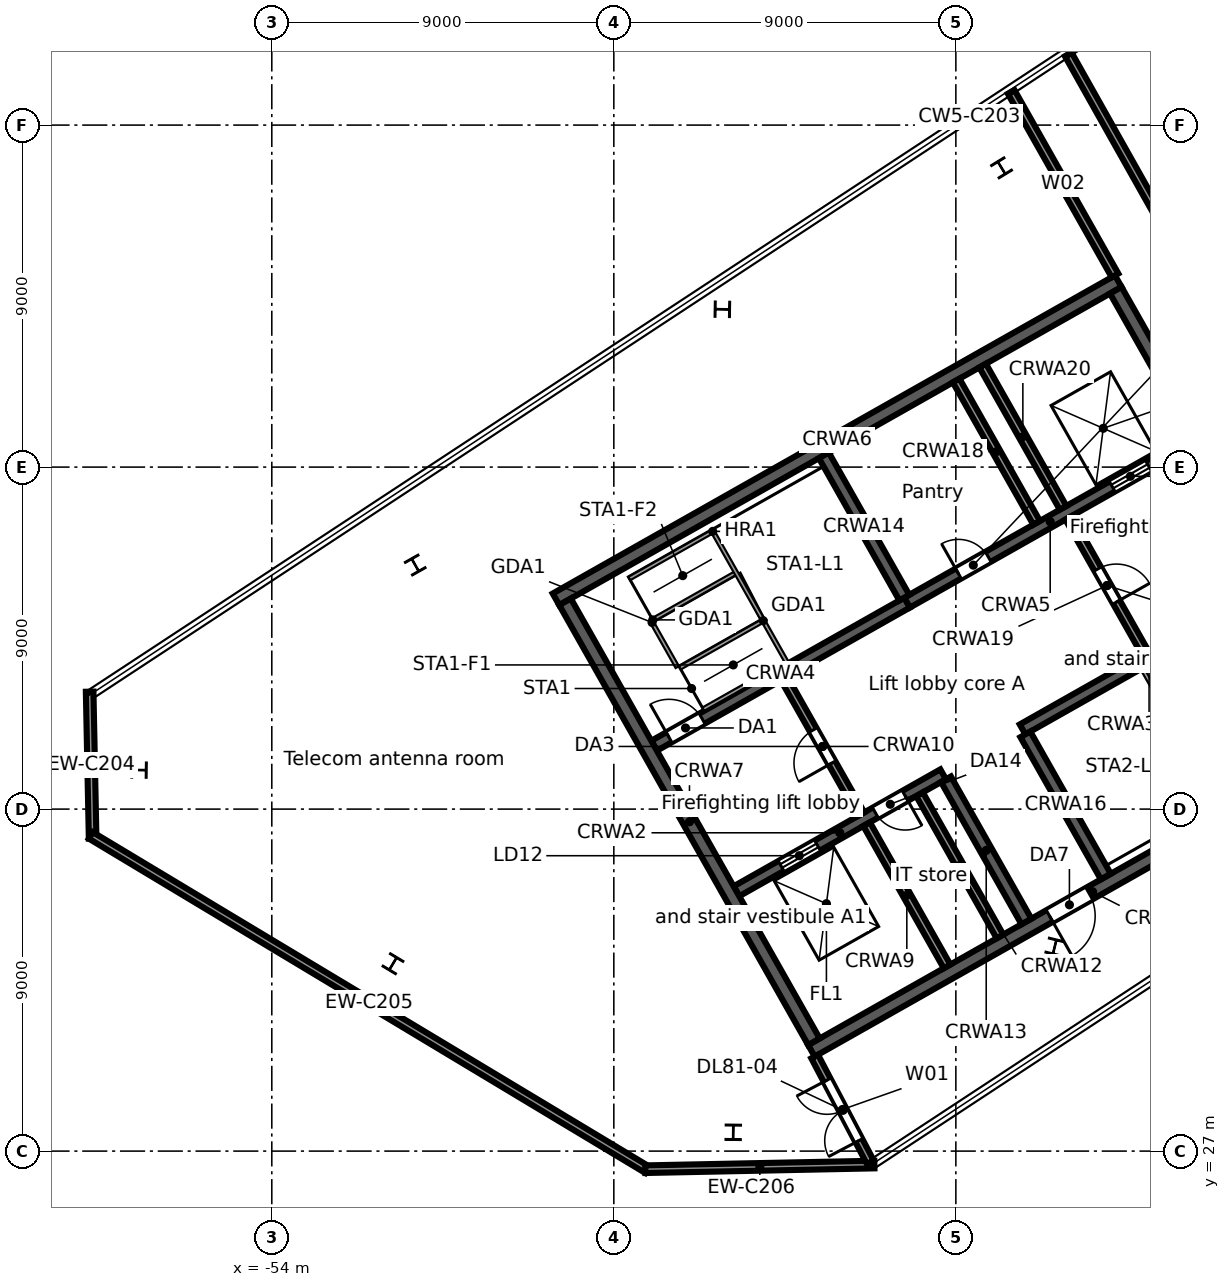
"""IFC4 building model, lengths in metres.
Left out: names, types, materials, properties, quantities, classifications, styles, units other than length and angle.
Written with IfcOpenShell. Run it as: python <this file> out.ifc"""

import sys

from ifc_helpers import new_model, si_unit, direction, frame, frame_2d, origin, origin_2d, place, context, subcontext, project, spatial, rectangle, i_section, extrude, element, fill, save


model = new_model("IFC4")
c1 = context("Model", 3, precision=1e-05, world=origin(), true_north=direction((0.0, 1.0)))
c2 = subcontext(c1, "Body", "Model", "MODEL_VIEW")
j1 = project(units=[si_unit("LENGTHUNIT", "METRE"), si_unit("PLANEANGLEUNIT", "RADIAN")], contexts=[c1])
p1 = place(None, origin())
s1 = spatial("IfcSite", under=j1, at=p1, CompositionType="ELEMENT")
p2 = place(p1, origin())
s2 = spatial("IfcBuilding", under=s1, at=p2, CompositionType="ELEMENT")
p3 = place(p2, frame((0.0, 0.0, 354.1)))
s3 = spatial("IfcBuildingStorey", under=s2, at=p3, CompositionType="ELEMENT", Elevation=354.1)
for number, where, z_axis, x_axis in (
    (1, (-50.226, 42.423, 0.0), (0.0, 0.0, 1.0), (-0.87, -0.492, 0.0)),
    (2, (-57.493, 37.027, 0.0), (0.0, 0.0, 1.0), (-0.013, -1.0, 0.0)),
    (3, (-50.812, 31.931, 0.0), (0.0, 0.0, 1.0), (0.857, -0.515, 0.0)),
    (4, (-41.858, 27.495, 0.0), (0.0, 0.0, 1.0), (1.0, -0.013, 0.0)),
):
    element("IfcColumn", number, at=place(p3, frame(where, z_axis=z_axis, x_axis=x_axis)), inside=s3, PredefinedType="COLUMN", context=c2, shape_type="SweptSolid", body=[
        extrude(i_section(OverallWidth=0.4, OverallDepth=0.4, WebThickness=0.013, FlangeThickness=0.021, FilletRadius=0.022, at=origin_2d()), origin(), (0.0, 0.0, 1.0), 3.6),
    ])
for number, where, z_axis, x_axis in (
    (5, (-34.798, 52.875, -0.3), (0.0, 0.0, 1.0), (0.853, 0.521, 0.0)),
    (6, (-42.144, 49.153, -0.3), (0.0, 0.0, 1.0), (0.018, 1.0, 0.0)),
    (7, (-33.4, 32.374, -0.3), (0.0, 0.0, 1.0), (-0.971, 0.239, 0.0)),
):
    element("IfcColumn", number, at=place(p3, frame(where, z_axis=z_axis, x_axis=x_axis)), inside=s3, PredefinedType="COLUMN", context=c2, shape_type="SweptSolid", body=[
        extrude(i_section(OverallWidth=0.4, OverallDepth=0.4, WebThickness=0.013, FlangeThickness=0.021, FilletRadius=0.022, at=origin_2d()), origin(), (0.0, 0.0, 1.0), 3.9),
    ])
p4 = place(p3, frame((-58.715, 35.225, 0.0), z_axis=(0.0, 0.0, 1.0), x_axis=(-0.020271225376, 0.999794517599, 0.0)))
e8 = element("IfcWall", 8, at=p4, inside=s3, PredefinedType="STANDARD", context=c2, shape_type="SweptSolid", body=[
    extrude(rectangle(XDim=3.866, YDim=0.2, at=frame_2d((1.933, 0.0))), origin(), (0.0, 0.0, 1.0), 3.3),
])
p5 = place(p3, frame((-44.119, 26.51, 0.0), z_axis=(0.0, 0.0, 1.0), x_axis=(-0.857172484352, 0.515029447769, 0.0)))
e9 = element("IfcWall", 9, at=p5, inside=s3, PredefinedType="STANDARD", context=c2, shape_type="SweptSolid", body=[
    extrude(rectangle(XDim=17.084, YDim=0.2, at=frame_2d((8.542, 0.0))), origin(), (0.0, 0.0, 1.0), 3.3),
])
p6 = place(p3, frame((-38.144, 26.646, 0.0), z_axis=(0.0, 0.0, 1.0), x_axis=(-0.999795108808, -0.020242045449, 0.0)))
e10 = element("IfcWall", 10, at=p6, inside=s3, PredefinedType="STANDARD", context=c2, shape_type="SweptSolid", body=[
    extrude(rectangle(XDim=6.031, YDim=0.2, at=frame_2d((3.015, 0.0))), origin(), (0.0, 0.0, 1.0), 3.3),
])
p7 = place(p3, frame((-39.801, 29.64, 0.0), z_axis=(0.0, 0.0, 1.0), x_axis=(0.870359753402, 0.492416388494, 0.0)))
e11 = element("IfcWall", 11, at=p7, inside=s3, PredefinedType="SOLIDWALL", context=c2, shape_type="SweptSolid", body=[
    extrude(rectangle(XDim=17.0, YDim=0.35, at=frame_2d((8.5, 0.0))), origin(), (0.0, 0.0, 1.0), 3.3),
])
p8 = place(p7, frame((7.2, 0.0, 0.0)))
e12 = element("IfcOpeningElement", 12, at=p8, cuts=e11, PredefinedType="OPENING", context=c2, shape_type="SweptSolid", body=[
    extrude(rectangle(XDim=1.2, YDim=2.1, at=frame_2d((0.6, 1.05))), frame((0.0, 0.185, 0.0), z_axis=(0.0, -1.0, 0.0), x_axis=(1.0, 0.0, 0.0)), (0.0, 0.0, 1.0), 0.37),
])
p9 = place(p3, frame((-41.774, 33.838, 0.0), z_axis=(0.0, 0.0, 1.0), x_axis=(0.870355415866, 0.492424055132, 0.0)))
e13 = element("IfcWall", 13, at=p9, inside=s3, PredefinedType="SOLIDWALL", context=c2, shape_type="SweptSolid", body=[
    extrude(rectangle(XDim=6.25, YDim=0.3, at=frame_2d((3.125, 0.0))), origin(), (0.0, 0.0, 1.0), 3.3),
])
p10 = place(p9, frame((1.35, 0.0, 0.0)))
e14 = element("IfcOpeningElement", 14, at=p10, cuts=e13, PredefinedType="OPENING", context=c2, shape_type="SweptSolid", body=[
    extrude(rectangle(XDim=1.1, YDim=2.1, at=frame_2d((0.55, 1.05))), frame((0.0, 0.16, 0.0), z_axis=(0.0, -1.0, 0.0), x_axis=(1.0, 0.0, 0.0)), (0.0, 0.0, 1.0), 0.32),
])
p11 = place(p9, frame((4.2, 0.0, 0.0)))
e15 = element("IfcOpeningElement", 15, at=p11, cuts=e13, PredefinedType="OPENING", context=c2, shape_type="SweptSolid", body=[
    extrude(rectangle(XDim=0.9, YDim=2.1, at=frame_2d((0.45, 1.05))), frame((0.0, 0.16, 0.0), z_axis=(0.0, -1.0, 0.0), x_axis=(1.0, 0.0, 0.0)), (0.0, 0.0, 1.0), 0.32),
])
p12 = place(p3, frame((-34.245, 38.097, 0.0), z_axis=(0.0, 0.0, 1.0), x_axis=(0.870352347706, 0.49242947804, 0.0)))
e16 = element("IfcWall", 16, at=p12, inside=s3, PredefinedType="SOLIDWALL", context=c2, shape_type="SweptSolid", body=[
    extrude(rectangle(XDim=7.65, YDim=0.3, at=frame_2d((3.825, 0.0))), origin(), (0.0, 0.0, 1.0), 3.3),
])
p13 = place(p12, frame((6.2, 0.0, 0.0)))
e17 = element("IfcOpeningElement", 17, at=p13, cuts=e16, PredefinedType="OPENING", context=c2, shape_type="SweptSolid", body=[
    extrude(rectangle(XDim=1.0, YDim=2.1, at=frame_2d((0.5, 1.05))), frame((0.0, 0.16, 0.0), z_axis=(0.0, -1.0, 0.0), x_axis=(1.0, 0.0, 0.0)), (0.0, 0.0, 1.0), 0.32),
])
p14 = place(p3, frame((-43.94, 37.667, 0.0), z_axis=(0.0, 0.0, 1.0), x_axis=(0.870352347706, 0.49242947804, 0.0)))
e18 = element("IfcWall", 18, at=p14, inside=s3, PredefinedType="SOLIDWALL", context=c2, shape_type="SweptSolid", body=[
    extrude(rectangle(XDim=7.65, YDim=0.3, at=frame_2d((3.825, 0.0))), origin(), (0.0, 0.0, 1.0), 3.3),
])
p15 = place(p14, frame((0.45, 0.0, 0.0)))
e19 = element("IfcOpeningElement", 19, at=p15, cuts=e18, PredefinedType="OPENING", context=c2, shape_type="SweptSolid", body=[
    extrude(rectangle(XDim=1.0, YDim=2.1, at=frame_2d((0.5, 1.05))), frame((0.0, 0.16, 0.0), z_axis=(0.0, -1.0, 0.0), x_axis=(1.0, 0.0, 0.0)), (0.0, 0.0, 1.0), 0.32),
])
p16 = place(p3, frame((-37.282, 41.435, 0.0), z_axis=(0.0, 0.0, 1.0), x_axis=(0.870364588774, 0.492407841741, 0.0)))
e20 = element("IfcWall", 20, at=p16, inside=s3, PredefinedType="SOLIDWALL", context=c2, shape_type="SweptSolid", body=[
    extrude(rectangle(XDim=8.65, YDim=0.3, at=frame_2d((4.325, 0.0))), origin(), (0.0, 0.0, 1.0), 3.3),
])
p17 = place(p16, frame((6.2, 0.0, 0.0)))
e21 = element("IfcOpeningElement", 21, at=p17, cuts=e20, PredefinedType="OPENING", context=c2, shape_type="SweptSolid", body=[
    extrude(rectangle(XDim=1.1, YDim=2.1, at=frame_2d((0.55, 1.05))), frame((0.0, 0.16, 0.0), z_axis=(0.0, -1.0, 0.0), x_axis=(1.0, 0.0, 0.0)), (0.0, 0.0, 1.0), 0.32),
])
p18 = place(p16, frame((1.55, 0.0, 0.0)))
e22 = element("IfcOpeningElement", 22, at=p18, cuts=e20, PredefinedType="OPENING", context=c2, shape_type="SweptSolid", body=[
    extrude(rectangle(XDim=0.9, YDim=2.1, at=frame_2d((0.45, 1.05))), frame((0.0, 0.16, 0.0), z_axis=(0.0, -1.0, 0.0), x_axis=(1.0, 0.0, 0.0)), (0.0, 0.0, 1.0), 0.32),
])
p19 = place(p3, frame((-46.522, 41.521, 0.0), z_axis=(0.0, 0.0, 1.0), x_axis=(0.870359753402, 0.492416388494, 0.0)))
e23 = element("IfcWall", 23, at=p19, inside=s3, PredefinedType="SOLIDWALL", context=c2, shape_type="SweptSolid", body=[
    extrude(rectangle(XDim=17.0, YDim=0.35, at=frame_2d((8.5, 0.0))), origin(), (0.0, 0.0, 1.0), 3.3),
])
p20 = place(p3, frame((-46.284, 41.454, 0.0), z_axis=(0.0, 0.0, 1.0), x_axis=(0.492429810477, -0.870352159619, 0.0)))
e24 = element("IfcWall", 24, at=p20, inside=s3, PredefinedType="SOLIDWALL", context=c2, shape_type="SweptSolid", body=[
    extrude(rectangle(XDim=13.3, YDim=0.35, at=frame_2d((6.65, 0.0))), origin(), (0.0, 0.0, 1.0), 3.3),
])
p21 = place(p3, frame((-38.349, 35.603, 0.0), z_axis=(0.0, 0.0, 1.0), x_axis=(0.492410799949, -0.870362915164, 0.0)))
e25 = element("IfcWall", 25, at=p21, inside=s3, PredefinedType="SOLIDWALL", context=c2, shape_type="SweptSolid", body=[
    extrude(rectangle(XDim=4.3, YDim=0.2, at=frame_2d((2.15, 0.0))), origin(), (0.0, 0.0, 1.0), 3.3),
])
p22 = place(p3, frame((-40.516, 39.433, 0.0), z_axis=(0.0, 0.0, 1.0), x_axis=(0.492453559952, -0.87033872216, 0.0)))
e26 = element("IfcWall", 26, at=p22, inside=s3, PredefinedType="PARTITIONING", context=c2, shape_type="SweptSolid", body=[
    extrude(rectangle(XDim=4.1, YDim=0.2, at=frame_2d((2.05, 0.0))), origin(), (0.0, 0.0, 1.0), 3.3),
])
p23 = place(p22, frame((1.55, 0.0, 0.0)))
e27 = element("IfcOpeningElement", 27, at=p23, cuts=e26, PredefinedType="OPENING", context=c2, shape_type="SweptSolid", body=[
    extrude(rectangle(XDim=1.0, YDim=2.1, at=frame_2d((0.5, 1.05))), frame((0.0, 0.11, 0.0), z_axis=(0.0, -1.0, 0.0), x_axis=(1.0, 0.0, 0.0)), (0.0, 0.0, 1.0), 0.22),
])
p24 = place(p3, frame((-36.956, 36.391, 0.0), z_axis=(0.0, 0.0, 1.0), x_axis=(0.492410799949, -0.870362915164, 0.0)))
e28 = element("IfcWall", 28, at=p24, inside=s3, PredefinedType="SOLIDWALL", context=c2, shape_type="SweptSolid", body=[
    extrude(rectangle(XDim=4.3, YDim=0.2, at=frame_2d((2.15, 0.0))), origin(), (0.0, 0.0, 1.0), 3.3),
])
p25 = place(p3, frame((-36.26, 36.785, 0.0), z_axis=(0.0, 0.0, 1.0), x_axis=(0.492435133428, -0.870349147967, 0.0)))
e29 = element("IfcWall", 29, at=p25, inside=s3, PredefinedType="SOLIDWALL", context=c2, shape_type="SweptSolid", body=[
    extrude(rectangle(XDim=4.3, YDim=0.3, at=frame_2d((2.15, 0.0))), origin(), (0.0, 0.0, 1.0), 3.3),
])
p26 = place(p3, frame((-39.473, 45.308, 0.0), z_axis=(0.0, 0.0, 1.0), x_axis=(0.492410799949, -0.870362915164, 0.0)))
e30 = element("IfcWall", 30, at=p26, inside=s3, PredefinedType="SOLIDWALL", context=c2, shape_type="SweptSolid", body=[
    extrude(rectangle(XDim=4.3, YDim=0.3, at=frame_2d((2.15, 0.0))), origin(), (0.0, 0.0, 1.0), 3.3),
])
p27 = place(p3, frame((-34.171, 37.967, 0.0), z_axis=(0.0, 0.0, 1.0), x_axis=(0.492435133428, -0.870349147967, 0.0)))
e31 = element("IfcWall", 31, at=p27, inside=s3, PredefinedType="SOLIDWALL", context=c2, shape_type="SweptSolid", body=[
    extrude(rectangle(XDim=4.3, YDim=0.3, at=frame_2d((2.15, 0.0))), origin(), (0.0, 0.0, 1.0), 3.3),
])
p28 = place(p3, frame((-35.992, 47.277, 0.0), z_axis=(0.0, 0.0, 1.0), x_axis=(0.492410799949, -0.870362915164, 0.0)))
e32 = element("IfcWall", 32, at=p28, inside=s3, PredefinedType="SOLIDWALL", context=c2, shape_type="SweptSolid", body=[
    extrude(rectangle(XDim=4.3, YDim=0.2, at=frame_2d((2.15, 0.0))), origin(), (0.0, 0.0, 1.0), 3.3),
])
p29 = place(p3, frame((-33.031, 43.667, 0.0), z_axis=(0.0, 0.0, 1.0), x_axis=(0.492408451753, -0.87036424366, 0.0)))
e33 = element("IfcWall", 33, at=p29, inside=s3, PredefinedType="PARTITIONING", context=c2, shape_type="SweptSolid", body=[
    extrude(rectangle(XDim=4.1, YDim=0.2, at=frame_2d((2.05, 0.0))), origin(), (0.0, 0.0, 1.0), 3.3),
])
p30 = place(p29, frame((1.55, 0.0, 0.0)))
e34 = element("IfcOpeningElement", 34, at=p30, cuts=e33, PredefinedType="OPENING", context=c2, shape_type="SweptSolid", body=[
    extrude(rectangle(XDim=1.0, YDim=2.1, at=frame_2d((0.5, 1.05))), frame((0.0, 0.11, 0.0), z_axis=(0.0, -1.0, 0.0), x_axis=(1.0, 0.0, 0.0)), (0.0, 0.0, 1.0), 0.22),
])
p31 = place(p3, frame((-35.296, 47.671, 0.0), z_axis=(0.0, 0.0, 1.0), x_axis=(0.492435133428, -0.870349147967, 0.0)))
e35 = element("IfcWall", 35, at=p31, inside=s3, PredefinedType="SOLIDWALL", context=c2, shape_type="SweptSolid", body=[
    extrude(rectangle(XDim=4.3, YDim=0.2, at=frame_2d((2.15, 0.0))), origin(), (0.0, 0.0, 1.0), 3.3),
])
p32 = place(p3, frame((-31.792, 49.653, 0.0), z_axis=(0.0, 0.0, 1.0), x_axis=(0.492421943245, -0.870356610712, 0.0)))
e36 = element("IfcWall", 36, at=p32, inside=s3, PredefinedType="SOLIDWALL", context=c2, shape_type="SweptSolid", body=[
    extrude(rectangle(XDim=13.3, YDim=0.35, at=frame_2d((6.65, 0.0))), origin(), (0.0, 0.0, 1.0), 3.3),
])
p33 = place(p3, frame((-39.715, 29.488, 0.0), z_axis=(0.0, 0.0, 1.0), x_axis=(0.465711249011, -0.884936739289, 0.0)))
e37 = element("IfcWall", 37, at=p33, inside=s3, PredefinedType="PARTITIONING", context=c2, shape_type="SweptSolid", body=[
    extrude(rectangle(XDim=3.146, YDim=0.2, at=frame_2d((1.573, 0.0))), origin(), (0.0, 0.0, 1.0), 2.68),
])
p34 = place(p33, frame((0.7, 0.0, 0.0)))
e38 = element("IfcOpeningElement", 38, at=p34, cuts=e37, PredefinedType="OPENING", context=c2, shape_type="SweptSolid", body=[
    extrude(rectangle(XDim=1.8, YDim=2.1, at=frame_2d((0.9, 1.05))), frame((0.0, 0.11, 0.0), z_axis=(0.0, -1.0, 0.0), x_axis=(1.0, 0.0, 0.0)), (0.0, 0.0, 1.0), 0.22),
])
p35 = place(p3, frame((-34.544, 54.873, 0.0), z_axis=(0.0, 0.0, 1.0), x_axis=(0.492390708412, -0.870374281714, 0.0)))
e39 = element("IfcWall", 39, at=p35, inside=s3, PredefinedType="PARTITIONING", context=c2, shape_type="SweptSolid", body=[
    extrude(rectangle(XDim=5.548, YDim=0.2, at=frame_2d((2.774, 0.0))), origin(), (0.0, 0.0, 1.0), 2.68),
])
p36 = place(p3, frame((-33.042, 55.86, 0.0), z_axis=(0.0, 0.0, 1.0), x_axis=(0.490288138745, -0.871560405828, 0.0)))
e40 = element("IfcWall", 40, at=p36, inside=s3, PredefinedType="PARTITIONING", context=c2, shape_type="SweptSolid", body=[
    extrude(rectangle(XDim=17.667, YDim=0.2, at=frame_2d((8.834, 0.0))), origin(), (0.0, 0.0, 1.0), 2.68),
])
p37 = place(p17, origin())
e41 = element("IfcDoor", 41, at=p37, inside=s3, OperationType="DOUBLE_DOOR_SLIDING", PredefinedType="DOOR", context=c2, shape_type="SweptSolid", body=[
    extrude(rectangle(XDim=1.1, YDim=2.1, at=frame_2d((0.55, 1.05))), frame((0.0, 0.025, 0.0), z_axis=(0.0, -1.0, 0.0), x_axis=(1.0, 0.0, 0.0)), (0.0, 0.0, 1.0), 0.05),
])
fill(e21, e41)
p38 = place(p10, origin())
e42 = element("IfcDoor", 42, at=p38, inside=s3, OperationType="DOUBLE_DOOR_SLIDING", PredefinedType="DOOR", context=c2, shape_type="SweptSolid", body=[
    extrude(rectangle(XDim=1.1, YDim=2.1, at=frame_2d((0.55, 1.05))), frame((0.0, 0.025, 0.0), z_axis=(0.0, -1.0, 0.0), x_axis=(1.0, 0.0, 0.0)), (0.0, 0.0, 1.0), 0.05),
])
fill(e14, e42)
p39 = place(p15, origin())
e43 = element("IfcDoor", 43, at=p39, inside=s3, OperationType="SINGLE_SWING_LEFT", PredefinedType="DOOR", context=c2, shape_type="SweptSolid", body=[
    extrude(rectangle(XDim=1.0, YDim=2.1, at=frame_2d((0.5, 1.05))), frame((0.0, 0.025, 0.0), z_axis=(0.0, -1.0, 0.0), x_axis=(1.0, 0.0, 0.0)), (0.0, 0.0, 1.0), 0.05),
])
fill(e19, e43)
p40 = place(p23, frame((1.0, 0.0, 0.0), z_axis=(0.0, 0.0, 1.0), x_axis=(-1.0, 0.0, 0.0)))
e44 = element("IfcDoor", 44, at=p40, inside=s3, OperationType="SINGLE_SWING_LEFT", PredefinedType="DOOR", context=c2, shape_type="SweptSolid", body=[
    extrude(rectangle(XDim=1.0, YDim=2.1, at=frame_2d((0.5, 1.05))), frame((0.0, 0.025, 0.0), z_axis=(0.0, -1.0, 0.0), x_axis=(1.0, 0.0, 0.0)), (0.0, 0.0, 1.0), 0.05),
])
fill(e27, e44)
p41 = place(p30, origin())
e45 = element("IfcDoor", 45, at=p41, inside=s3, OperationType="SINGLE_SWING_RIGHT", PredefinedType="DOOR", context=c2, shape_type="SweptSolid", body=[
    extrude(rectangle(XDim=1.0, YDim=2.1, at=frame_2d((0.5, 1.05))), frame((0.0, 0.025, 0.0), z_axis=(0.0, -1.0, 0.0), x_axis=(1.0, 0.0, 0.0)), (0.0, 0.0, 1.0), 0.05),
])
fill(e34, e45)
p42 = place(p8, frame((1.2, 0.0, 0.0), z_axis=(0.0, 0.0, 1.0), x_axis=(-1.0, 0.0, 0.0)))
e46 = element("IfcDoor", 46, at=p42, inside=s3, OperationType="SINGLE_SWING_RIGHT", PredefinedType="DOOR", context=c2, shape_type="SweptSolid", body=[
    extrude(rectangle(XDim=1.2, YDim=2.1, at=frame_2d((0.6, 1.05))), frame((0.0, 0.025, 0.0), z_axis=(0.0, -1.0, 0.0), x_axis=(1.0, 0.0, 0.0)), (0.0, 0.0, 1.0), 0.05),
])
fill(e12, e46)
p43 = place(p18, origin())
e47 = element("IfcDoor", 47, at=p43, inside=s3, OperationType="SINGLE_SWING_LEFT", PredefinedType="DOOR", context=c2, shape_type="SweptSolid", body=[
    extrude(rectangle(XDim=0.9, YDim=2.1, at=frame_2d((0.45, 1.05))), frame((0.0, 0.025, 0.0), z_axis=(0.0, -1.0, 0.0), x_axis=(1.0, 0.0, 0.0)), (0.0, 0.0, 1.0), 0.05),
])
fill(e22, e47)
p44 = place(p11, frame((0.9, 0.0, 0.0), z_axis=(0.0, 0.0, 1.0), x_axis=(-1.0, 0.0, 0.0)))
e48 = element("IfcDoor", 48, at=p44, inside=s3, OperationType="SINGLE_SWING_LEFT", PredefinedType="DOOR", context=c2, shape_type="SweptSolid", body=[
    extrude(rectangle(XDim=0.9, YDim=2.1, at=frame_2d((0.45, 1.05))), frame((0.0, 0.025, 0.0), z_axis=(0.0, -1.0, 0.0), x_axis=(1.0, 0.0, 0.0)), (0.0, 0.0, 1.0), 0.05),
])
fill(e15, e48)
p45 = place(p34, frame((1.8, 0.0, 0.0), z_axis=(0.0, 0.0, 1.0), x_axis=(-1.0, 0.0, 0.0)))
e49 = element("IfcDoor", 49, at=p45, inside=s3, OperationType="DOUBLE_DOOR_SINGLE_SWING", PredefinedType="DOOR", context=c2, shape_type="SweptSolid", body=[
    extrude(rectangle(XDim=1.8, YDim=2.1, at=frame_2d((0.9, 1.05))), frame((0.0, 0.025, 0.0), z_axis=(0.0, -1.0, 0.0), x_axis=(1.0, 0.0, 0.0)), (0.0, 0.0, 1.0), 0.05),
])
fill(e38, e49)
save(model, sys.argv[1])
